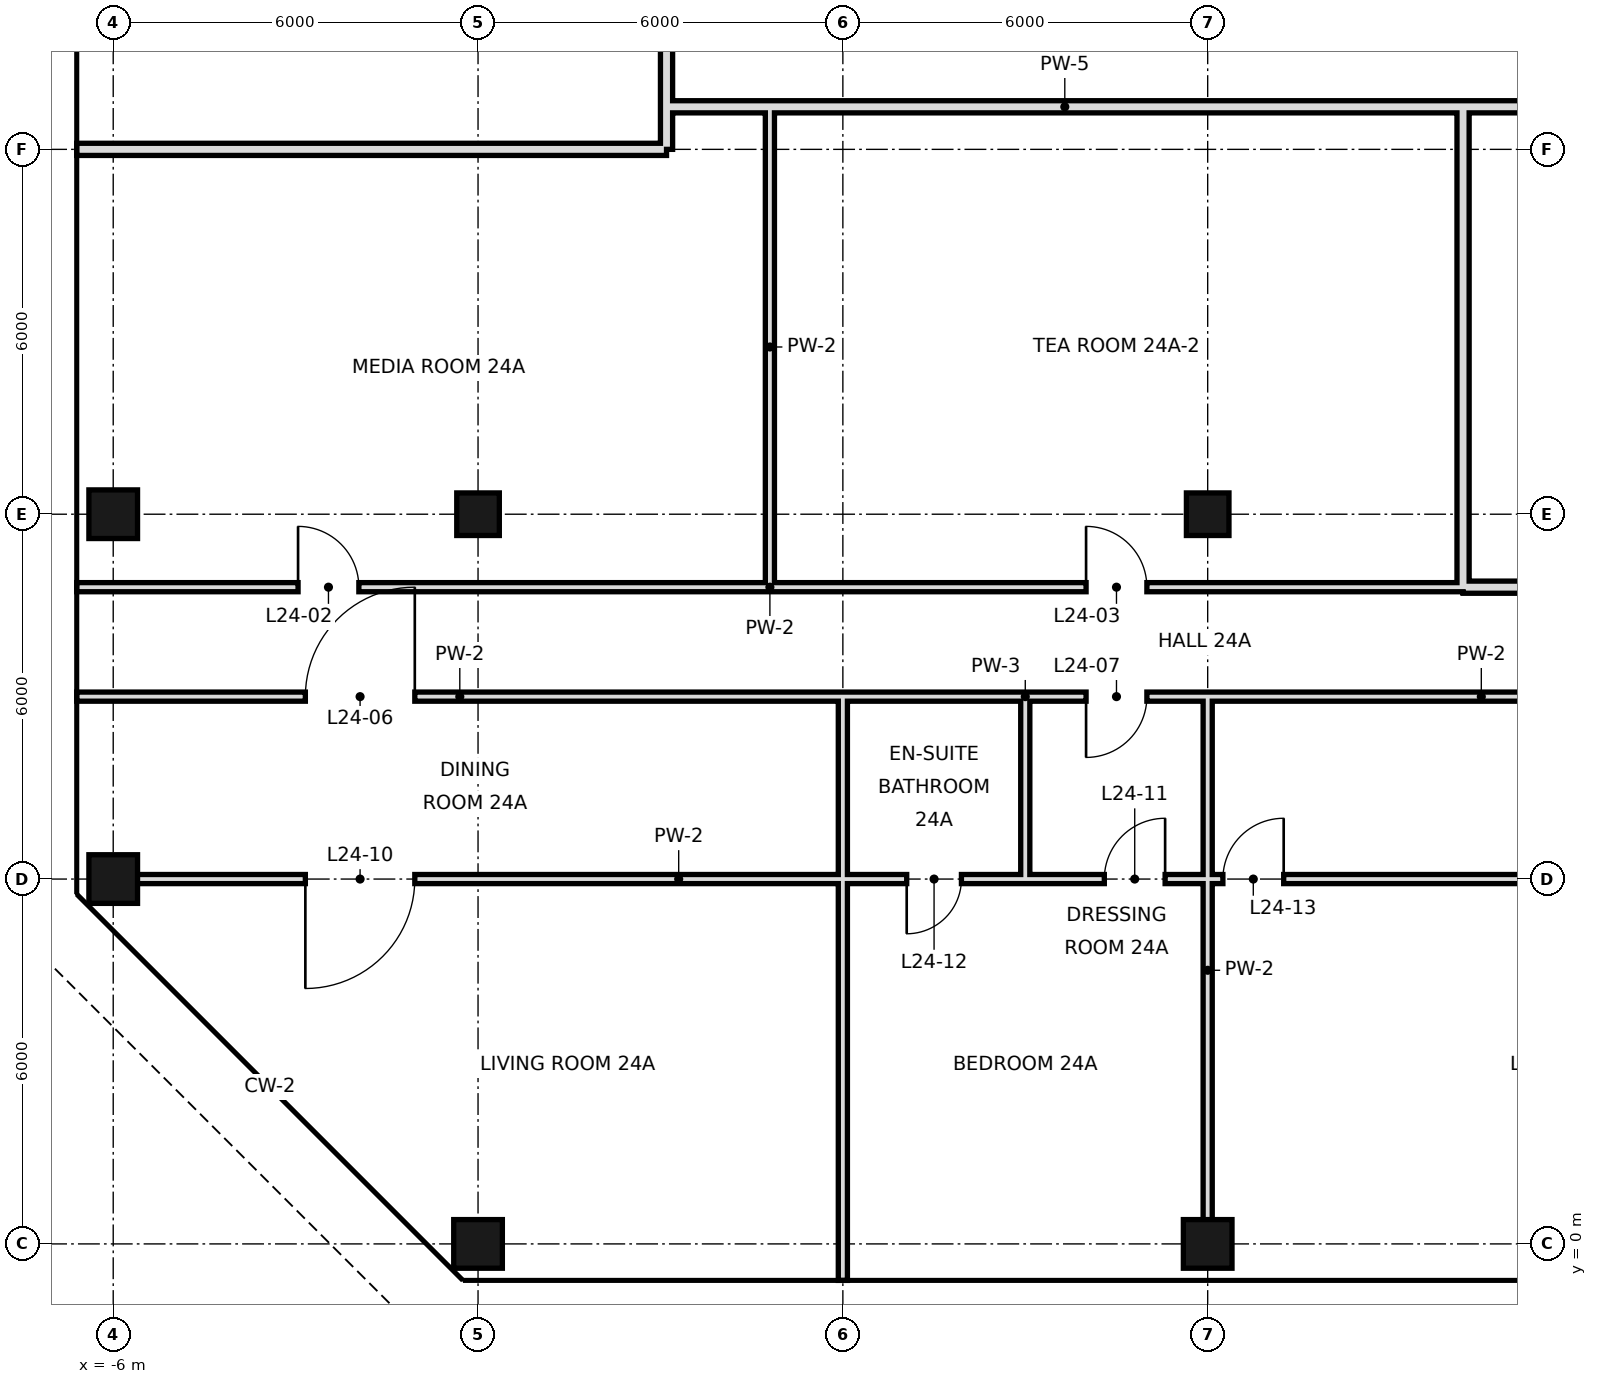
"""IFC4 building model, lengths in metres.
Left out: names, types, materials, properties, quantities, classifications, styles, units other than length and angle.
Written with IfcOpenShell. Run it as: python <this file> out.ifc"""

import sys

from ifc_helpers import new_model, si_unit, direction, frame, frame_2d, origin, origin_2d, place, context, subcontext, project, spatial, rectangle, hollow_rectangle, extrude, element, fill, save


model = new_model("IFC4")
c1 = context("Model", 3, precision=1e-05, world=origin(), true_north=direction((0.0, 1.0)))
c2 = subcontext(c1, "Body", "Model", "MODEL_VIEW")
j1 = project(units=[si_unit("LENGTHUNIT", "METRE"), si_unit("PLANEANGLEUNIT", "RADIAN")], contexts=[c1])
p1 = place(None, origin())
s1 = spatial("IfcSite", under=j1, at=p1, CompositionType="ELEMENT")
p2 = place(p1, origin())
s2 = spatial("IfcBuilding", under=s1, at=p2, CompositionType="ELEMENT")
p3 = place(p2, frame((0.0, 0.0, 110.6)))
s3 = spatial("IfcBuildingStorey", under=s2, at=p3, CompositionType="ELEMENT", Elevation=110.6)
for number, where, z_axis, x_axis in (
    (1, (-6.0, 6.0, 0.0), (0.0, 0.0, 1.0), (1.0, 0.0, 0.0)),
    (2, (-6.0, 12.0, 0.0), (0.0, 0.0, 1.0), (1.0, 0.0, 0.0)),
    (3, (0.0, 0.0, 0.0), (0.0, 0.0, 1.0), (1.0, 0.0, 0.0)),
):
    element("IfcColumn", number, at=place(p3, frame(where, z_axis=z_axis, x_axis=x_axis)), inside=s3, PredefinedType="COLUMN", context=c2, shape_type="SweptSolid", body=[
        extrude(hollow_rectangle(XDim=0.8, YDim=0.8, WallThickness=0.04, at=origin_2d()), origin(), (0.0, 0.0, 1.0), 3.6),
    ])
p4 = place(p3, frame((0.0, 12.0, 0.0), z_axis=(0.0, 0.0, 1.0), x_axis=(1.0, 0.0, 0.0)))
e4 = element("IfcColumn", 4, at=p4, inside=s3, PredefinedType="COLUMN", context=c2, shape_type="SweptSolid", body=[
    extrude(hollow_rectangle(XDim=0.7, YDim=0.7, WallThickness=0.036, at=origin_2d()), origin(), (0.0, 0.0, 1.0), 3.6),
])
p5 = place(p3, frame((12.0, 0.0, 0.0), z_axis=(0.0, 0.0, 1.0), x_axis=(1.0, 0.0, 0.0)))
e5 = element("IfcColumn", 5, at=p5, inside=s3, PredefinedType="COLUMN", context=c2, shape_type="SweptSolid", body=[
    extrude(hollow_rectangle(XDim=0.8, YDim=0.8, WallThickness=0.04, at=origin_2d()), origin(), (0.0, 0.0, 1.0), 3.6),
])
p6 = place(p3, frame((12.0, 12.0, 0.0), z_axis=(0.0, 0.0, 1.0), x_axis=(1.0, 0.0, 0.0)))
e6 = element("IfcColumn", 6, at=p6, inside=s3, PredefinedType="COLUMN", context=c2, shape_type="SweptSolid", body=[
    extrude(hollow_rectangle(XDim=0.7, YDim=0.7, WallThickness=0.036, at=origin_2d()), origin(), (0.0, 0.0, 1.0), 3.6),
])
p7 = place(p3, frame((12.0, 0.0, 0.0), z_axis=(0.0, 0.0, 1.0), x_axis=(0.0, 1.0, 0.0)))
e7 = element("IfcWall", 7, at=p7, inside=s3, PredefinedType="PARTITIONING", context=c2, shape_type="SweptSolid", body=[
    extrude(rectangle(XDim=9.0, YDim=0.15, at=frame_2d((4.5, 0.0))), origin(), (0.0, 0.0, 1.0), 2.68),
])
p8 = place(p3, frame((16.2, 10.8, 0.0), z_axis=(0.0, 0.0, 1.0), x_axis=(0.0, 1.0, 0.0)))
e8 = element("IfcWall", 8, at=p8, inside=s3, PredefinedType="SOLIDWALL", context=c2, shape_type="SweptSolid", body=[
    extrude(rectangle(XDim=7.9, YDim=0.2, at=frame_2d((3.95, 0.0))), origin(), (0.0, 0.0, 1.0), 2.68),
])
p9 = place(p3, frame((3.1, 18.0, 0.0), z_axis=(0.0, 0.0, 1.0), x_axis=(0.0, 1.0, 0.0)))
e9 = element("IfcWall", 9, at=p9, inside=s3, PredefinedType="SOLIDWALL", context=c2, shape_type="SweptSolid", body=[
    extrude(rectangle(XDim=30.6, YDim=0.2, at=frame_2d((15.3, 0.0))), origin(), (0.0, 0.0, 1.0), 2.68),
])
p10 = place(p9, frame((9.23, 0.0, 0.0)))
e10 = element("IfcOpeningElement", 10, at=p10, cuts=e9, PredefinedType="OPENING", context=c2, shape_type="SweptSolid", body=[
    extrude(rectangle(XDim=1.2, YDim=2.4, at=frame_2d((0.6, 1.2))), frame((0.0, 0.11, 0.0), z_axis=(0.0, -1.0, 0.0), x_axis=(1.0, 0.0, 0.0)), (0.0, 0.0, 1.0), 0.22),
])
p11 = place(p3, frame((4.8, 10.8, 0.0), z_axis=(0.0, 0.0, 1.0), x_axis=(0.0, 1.0, 0.0)))
e11 = element("IfcWall", 11, at=p11, inside=s3, PredefinedType="PARTITIONING", context=c2, shape_type="SweptSolid", body=[
    extrude(rectangle(XDim=7.9, YDim=0.15, at=frame_2d((3.95, 0.0))), origin(), (0.0, 0.0, 1.0), 3.38),
])
p12 = place(p3, frame((6.0, -0.6, 0.0), z_axis=(0.0, 0.0, 1.0), x_axis=(0.0, 1.0, 0.0)))
e12 = element("IfcWall", 12, at=p12, inside=s3, PredefinedType="PARTITIONING", context=c2, shape_type="SweptSolid", body=[
    extrude(rectangle(XDim=6.6, YDim=0.15, at=frame_2d((3.3, 0.0))), origin(), (0.0, 0.0, 1.0), 2.68),
])
p13 = place(p3, frame((6.0, 6.0, 0.0), z_axis=(0.0, 0.0, 1.0), x_axis=(0.0, 1.0, 0.0)))
e13 = element("IfcWall", 13, at=p13, inside=s3, PredefinedType="PARTITIONING", context=c2, shape_type="SweptSolid", body=[
    extrude(rectangle(XDim=3.0, YDim=0.15, at=frame_2d((1.5, 0.0))), origin(), (0.0, 0.0, 1.0), 2.68),
])
p14 = place(p3, frame((9.0, 6.0, 0.0), z_axis=(0.0, 0.0, 1.0), x_axis=(0.0, 1.0, 0.0)))
e14 = element("IfcWall", 14, at=p14, inside=s3, PredefinedType="PARTITIONING", context=c2, shape_type="SweptSolid", body=[
    extrude(rectangle(XDim=3.0, YDim=0.15, at=frame_2d((1.5, 0.0))), origin(), (0.0, 0.0, 1.0), 3.38),
])
p15 = place(p3, frame((16.2, 10.8, 0.0), z_axis=(0.0, 0.0, 1.0), x_axis=(1.0, 0.0, 0.0)))
e15 = element("IfcWall", 15, at=p15, inside=s3, PredefinedType="SOLIDWALL", context=c2, shape_type="SweptSolid", body=[
    extrude(rectangle(XDim=5.4, YDim=0.2, at=frame_2d((2.7, 0.0))), origin(), (0.0, 0.0, 1.0), 2.68),
])
p16 = place(p15, frame((2.98, 0.0, 0.0)))
e16 = element("IfcOpeningElement", 16, at=p16, cuts=e15, PredefinedType="OPENING", context=c2, shape_type="SweptSolid", body=[
    extrude(rectangle(XDim=1.0, YDim=2.4, at=frame_2d((0.5, 1.2))), frame((0.0, 0.11, 0.0), z_axis=(0.0, -1.0, 0.0), x_axis=(1.0, 0.0, 0.0)), (0.0, 0.0, 1.0), 0.22),
])
p17 = place(p3, frame((-6.6, 10.8, 0.0), z_axis=(0.0, 0.0, 1.0), x_axis=(1.0, 0.0, 0.0)))
e17 = element("IfcWall", 17, at=p17, inside=s3, PredefinedType="PARTITIONING", context=c2, shape_type="SweptSolid", body=[
    extrude(rectangle(XDim=22.8, YDim=0.15, at=frame_2d((11.4, 0.0))), origin(), (0.0, 0.0, 1.0), 3.38),
])
p18 = place(p17, frame((3.64, 0.0, 0.0)))
e18 = element("IfcOpeningElement", 18, at=p18, cuts=e17, PredefinedType="OPENING", context=c2, shape_type="SweptSolid", body=[
    extrude(rectangle(XDim=1.0, YDim=2.4, at=frame_2d((0.5, 1.2))), frame((0.0, 0.085, 0.0), z_axis=(0.0, -1.0, 0.0), x_axis=(1.0, 0.0, 0.0)), (0.0, 0.0, 1.0), 0.17),
])
p19 = place(p17, frame((16.6, 0.0, 0.0)))
e19 = element("IfcOpeningElement", 19, at=p19, cuts=e17, PredefinedType="OPENING", context=c2, shape_type="SweptSolid", body=[
    extrude(rectangle(XDim=1.0, YDim=2.4, at=frame_2d((0.5, 1.2))), frame((0.0, 0.085, 0.0), z_axis=(0.0, -1.0, 0.0), x_axis=(1.0, 0.0, 0.0)), (0.0, 0.0, 1.0), 0.17),
])
p20 = place(p3, frame((-6.6, 18.0, 0.0), z_axis=(0.0, 0.0, 1.0), x_axis=(1.0, 0.0, 0.0)))
e20 = element("IfcWall", 20, at=p20, inside=s3, PredefinedType="SOLIDWALL", context=c2, shape_type="SweptSolid", body=[
    extrude(rectangle(XDim=9.7, YDim=0.2, at=frame_2d((4.85, 0.0))), origin(), (0.0, 0.0, 1.0), 2.68),
])
p21 = place(p3, frame((3.1, 18.7, 0.0), z_axis=(0.0, 0.0, 1.0), x_axis=(1.0, 0.0, 0.0)))
e21 = element("IfcWall", 21, at=p21, inside=s3, PredefinedType="SOLIDWALL", context=c2, shape_type="SweptSolid", body=[
    extrude(rectangle(XDim=13.1, YDim=0.2, at=frame_2d((6.55, 0.0))), origin(), (0.0, 0.0, 1.0), 2.68),
])
p22 = place(p3, frame((16.2, 18.7, 0.0), z_axis=(0.0, 0.0, 1.0), x_axis=(1.0, 0.0, 0.0)))
e22 = element("IfcWall", 22, at=p22, inside=s3, PredefinedType="SOLIDWALL", context=c2, shape_type="SweptSolid", body=[
    extrude(rectangle(XDim=5.4, YDim=0.2, at=frame_2d((2.7, 0.0))), origin(), (0.0, 0.0, 1.0), 2.68),
])
p23 = place(p3, frame((-6.0, 6.0, 0.0), z_axis=(0.0, 0.0, 1.0), x_axis=(1.0, 0.0, 0.0)))
e23 = element("IfcWall", 23, at=p23, inside=s3, PredefinedType="PARTITIONING", context=c2, shape_type="SweptSolid", body=[
    extrude(rectangle(XDim=12.0, YDim=0.15, at=frame_2d((6.0, 0.0))), origin(), (0.0, 0.0, 1.0), 2.93),
])
p24 = place(p23, frame((3.16, 0.0, 0.0)))
e24 = element("IfcOpeningElement", 24, at=p24, cuts=e23, PredefinedType="OPENING", context=c2, shape_type="SweptSolid", body=[
    extrude(rectangle(XDim=1.8, YDim=2.4, at=frame_2d((0.9, 1.2))), frame((0.0, 0.085, 0.0), z_axis=(0.0, -1.0, 0.0), x_axis=(1.0, 0.0, 0.0)), (0.0, 0.0, 1.0), 0.17),
])
p25 = place(p3, frame((9.0, 6.0, 0.0), z_axis=(0.0, 0.0, 1.0), x_axis=(1.0, 0.0, 0.0)))
e25 = element("IfcWall", 25, at=p25, inside=s3, PredefinedType="PARTITIONING", context=c2, shape_type="SweptSolid", body=[
    extrude(rectangle(XDim=15.0, YDim=0.15, at=frame_2d((7.5, 0.0))), origin(), (0.0, 0.0, 1.0), 2.93),
])
p26 = place(p25, frame((1.3, 0.0, 0.0)))
e26 = element("IfcOpeningElement", 26, at=p26, cuts=e25, PredefinedType="OPENING", context=c2, shape_type="SweptSolid", body=[
    extrude(rectangle(XDim=1.0, YDim=2.4, at=frame_2d((0.5, 1.2))), frame((0.0, 0.085, 0.0), z_axis=(0.0, -1.0, 0.0), x_axis=(1.0, 0.0, 0.0)), (0.0, 0.0, 1.0), 0.17),
])
p27 = place(p25, frame((3.25, 0.0, 0.0)))
e27 = element("IfcOpeningElement", 27, at=p27, cuts=e25, PredefinedType="OPENING", context=c2, shape_type="SweptSolid", body=[
    extrude(rectangle(XDim=1.0, YDim=2.4, at=frame_2d((0.5, 1.2))), frame((0.0, 0.085, 0.0), z_axis=(0.0, -1.0, 0.0), x_axis=(1.0, 0.0, 0.0)), (0.0, 0.0, 1.0), 0.17),
])
p28 = place(p3, frame((6.0, 6.0, 0.0), z_axis=(0.0, 0.0, 1.0), x_axis=(1.0, 0.0, 0.0)))
e28 = element("IfcWall", 28, at=p28, inside=s3, PredefinedType="PARTITIONING", context=c2, shape_type="SweptSolid", body=[
    extrude(rectangle(XDim=3.0, YDim=0.15, at=frame_2d((1.5, 0.0))), origin(), (0.0, 0.0, 1.0), 2.93),
])
p29 = place(p28, frame((1.05, 0.0, 0.0)))
e29 = element("IfcOpeningElement", 29, at=p29, cuts=e28, PredefinedType="OPENING", context=c2, shape_type="SweptSolid", body=[
    extrude(rectangle(XDim=0.9, YDim=2.4, at=frame_2d((0.45, 1.2))), frame((0.0, 0.085, 0.0), z_axis=(0.0, -1.0, 0.0), x_axis=(1.0, 0.0, 0.0)), (0.0, 0.0, 1.0), 0.17),
])
p30 = place(p3, frame((-6.6, 9.0, 0.0), z_axis=(0.0, 0.0, 1.0), x_axis=(1.0, 0.0, 0.0)))
e30 = element("IfcWall", 30, at=p30, inside=s3, PredefinedType="PARTITIONING", context=c2, shape_type="SweptSolid", body=[
    extrude(rectangle(XDim=12.6, YDim=0.15, at=frame_2d((6.3, 0.0))), origin(), (0.0, 0.0, 1.0), 3.38),
])
p31 = place(p30, frame((3.76, 0.0, 0.0)))
e31 = element("IfcOpeningElement", 31, at=p31, cuts=e30, PredefinedType="OPENING", context=c2, shape_type="SweptSolid", body=[
    extrude(rectangle(XDim=1.8, YDim=2.4, at=frame_2d((0.9, 1.2))), frame((0.0, 0.085, 0.0), z_axis=(0.0, -1.0, 0.0), x_axis=(1.0, 0.0, 0.0)), (0.0, 0.0, 1.0), 0.17),
])
p32 = place(p3, frame((9.0, 9.0, 0.0), z_axis=(0.0, 0.0, 1.0), x_axis=(1.0, 0.0, 0.0)))
e32 = element("IfcWall", 32, at=p32, inside=s3, PredefinedType="PARTITIONING", context=c2, shape_type="SweptSolid", body=[
    extrude(rectangle(XDim=15.0, YDim=0.15, at=frame_2d((7.5, 0.0))), origin(), (0.0, 0.0, 1.0), 3.38),
])
p33 = place(p32, frame((1.0, 0.0, 0.0)))
e33 = element("IfcOpeningElement", 33, at=p33, cuts=e32, PredefinedType="OPENING", context=c2, shape_type="SweptSolid", body=[
    extrude(rectangle(XDim=1.0, YDim=2.4, at=frame_2d((0.5, 1.2))), frame((0.0, 0.085, 0.0), z_axis=(0.0, -1.0, 0.0), x_axis=(1.0, 0.0, 0.0)), (0.0, 0.0, 1.0), 0.17),
])
p34 = place(p32, frame((10.6, 0.0, 0.0)))
e34 = element("IfcOpeningElement", 34, at=p34, cuts=e32, PredefinedType="OPENING", context=c2, shape_type="SweptSolid", body=[
    extrude(rectangle(XDim=1.0, YDim=2.4, at=frame_2d((0.5, 1.2))), frame((0.0, 0.085, 0.0), z_axis=(0.0, -1.0, 0.0), x_axis=(1.0, 0.0, 0.0)), (0.0, 0.0, 1.0), 0.17),
])
p35 = place(p3, frame((6.0, 9.0, 0.0), z_axis=(0.0, 0.0, 1.0), x_axis=(1.0, 0.0, 0.0)))
e35 = element("IfcWall", 35, at=p35, inside=s3, PredefinedType="PARTITIONING", context=c2, shape_type="SweptSolid", body=[
    extrude(rectangle(XDim=3.0, YDim=0.15, at=frame_2d((1.5, 0.0))), origin(), (0.0, 0.0, 1.0), 3.38),
])
p36 = place(p18, origin())
e36 = element("IfcDoor", 36, at=p36, inside=s3, OperationType="SINGLE_SWING_LEFT", PredefinedType="DOOR", context=c2, shape_type="SweptSolid", body=[
    extrude(rectangle(XDim=1.0, YDim=2.4, at=frame_2d((0.5, 1.2))), frame((0.0, 0.025, 0.0), z_axis=(0.0, -1.0, 0.0), x_axis=(1.0, 0.0, 0.0)), (0.0, 0.0, 1.0), 0.05),
])
fill(e18, e36)
p37 = place(p19, origin())
e37 = element("IfcDoor", 37, at=p37, inside=s3, OperationType="SINGLE_SWING_LEFT", PredefinedType="DOOR", context=c2, shape_type="SweptSolid", body=[
    extrude(rectangle(XDim=1.0, YDim=2.4, at=frame_2d((0.5, 1.2))), frame((0.0, 0.025, 0.0), z_axis=(0.0, -1.0, 0.0), x_axis=(1.0, 0.0, 0.0)), (0.0, 0.0, 1.0), 0.05),
])
fill(e19, e37)
p38 = place(p31, frame((1.8, 0.0, 0.0), z_axis=(0.0, 0.0, 1.0), x_axis=(-1.0, 0.0, 0.0)))
e38 = element("IfcDoor", 38, at=p38, inside=s3, OperationType="SINGLE_SWING_LEFT", PredefinedType="DOOR", context=c2, shape_type="SweptSolid", body=[
    extrude(rectangle(XDim=1.8, YDim=2.4, at=frame_2d((0.9, 1.2))), frame((0.0, 0.025, 0.0), z_axis=(0.0, -1.0, 0.0), x_axis=(1.0, 0.0, 0.0)), (0.0, 0.0, 1.0), 0.05),
])
fill(e31, e38)
p39 = place(p33, frame((1.0, 0.0, 0.0), z_axis=(0.0, 0.0, 1.0), x_axis=(-1.0, 0.0, 0.0)))
e39 = element("IfcDoor", 39, at=p39, inside=s3, OperationType="SINGLE_SWING_RIGHT", PredefinedType="DOOR", context=c2, shape_type="SweptSolid", body=[
    extrude(rectangle(XDim=1.0, YDim=2.4, at=frame_2d((0.5, 1.2))), frame((0.0, 0.025, 0.0), z_axis=(0.0, -1.0, 0.0), x_axis=(1.0, 0.0, 0.0)), (0.0, 0.0, 1.0), 0.05),
])
fill(e33, e39)
p40 = place(p24, frame((1.8, 0.0, 0.0), z_axis=(0.0, 0.0, 1.0), x_axis=(-1.0, 0.0, 0.0)))
e40 = element("IfcDoor", 40, at=p40, inside=s3, OperationType="SINGLE_SWING_RIGHT", PredefinedType="DOOR", context=c2, shape_type="SweptSolid", body=[
    extrude(rectangle(XDim=1.8, YDim=2.4, at=frame_2d((0.9, 1.2))), frame((0.0, 0.025, 0.0), z_axis=(0.0, -1.0, 0.0), x_axis=(1.0, 0.0, 0.0)), (0.0, 0.0, 1.0), 0.05),
])
fill(e24, e40)
p41 = place(p26, frame((1.0, 0.0, 0.0), z_axis=(0.0, 0.0, 1.0), x_axis=(-1.0, 0.0, 0.0)))
e41 = element("IfcDoor", 41, at=p41, inside=s3, OperationType="SINGLE_SWING_LEFT", PredefinedType="DOOR", context=c2, shape_type="SweptSolid", body=[
    extrude(rectangle(XDim=1.0, YDim=2.4, at=frame_2d((0.5, 1.2))), frame((0.0, 0.025, 0.0), z_axis=(0.0, -1.0, 0.0), x_axis=(1.0, 0.0, 0.0)), (0.0, 0.0, 1.0), 0.05),
])
fill(e26, e41)
p42 = place(p29, frame((0.9, 0.0, 0.0), z_axis=(0.0, 0.0, 1.0), x_axis=(-1.0, 0.0, 0.0)))
e42 = element("IfcDoor", 42, at=p42, inside=s3, OperationType="SINGLE_SWING_RIGHT", PredefinedType="DOOR", context=c2, shape_type="SweptSolid", body=[
    extrude(rectangle(XDim=0.9, YDim=2.4, at=frame_2d((0.45, 1.2))), frame((0.0, 0.025, 0.0), z_axis=(0.0, -1.0, 0.0), x_axis=(1.0, 0.0, 0.0)), (0.0, 0.0, 1.0), 0.05),
])
fill(e29, e42)
p43 = place(p27, frame((1.0, 0.0, 0.0), z_axis=(0.0, 0.0, 1.0), x_axis=(-1.0, 0.0, 0.0)))
e43 = element("IfcDoor", 43, at=p43, inside=s3, OperationType="SINGLE_SWING_LEFT", PredefinedType="DOOR", context=c2, shape_type="SweptSolid", body=[
    extrude(rectangle(XDim=1.0, YDim=2.4, at=frame_2d((0.5, 1.2))), frame((0.0, 0.025, 0.0), z_axis=(0.0, -1.0, 0.0), x_axis=(1.0, 0.0, 0.0)), (0.0, 0.0, 1.0), 0.05),
])
fill(e27, e43)
save(model, sys.argv[1])
